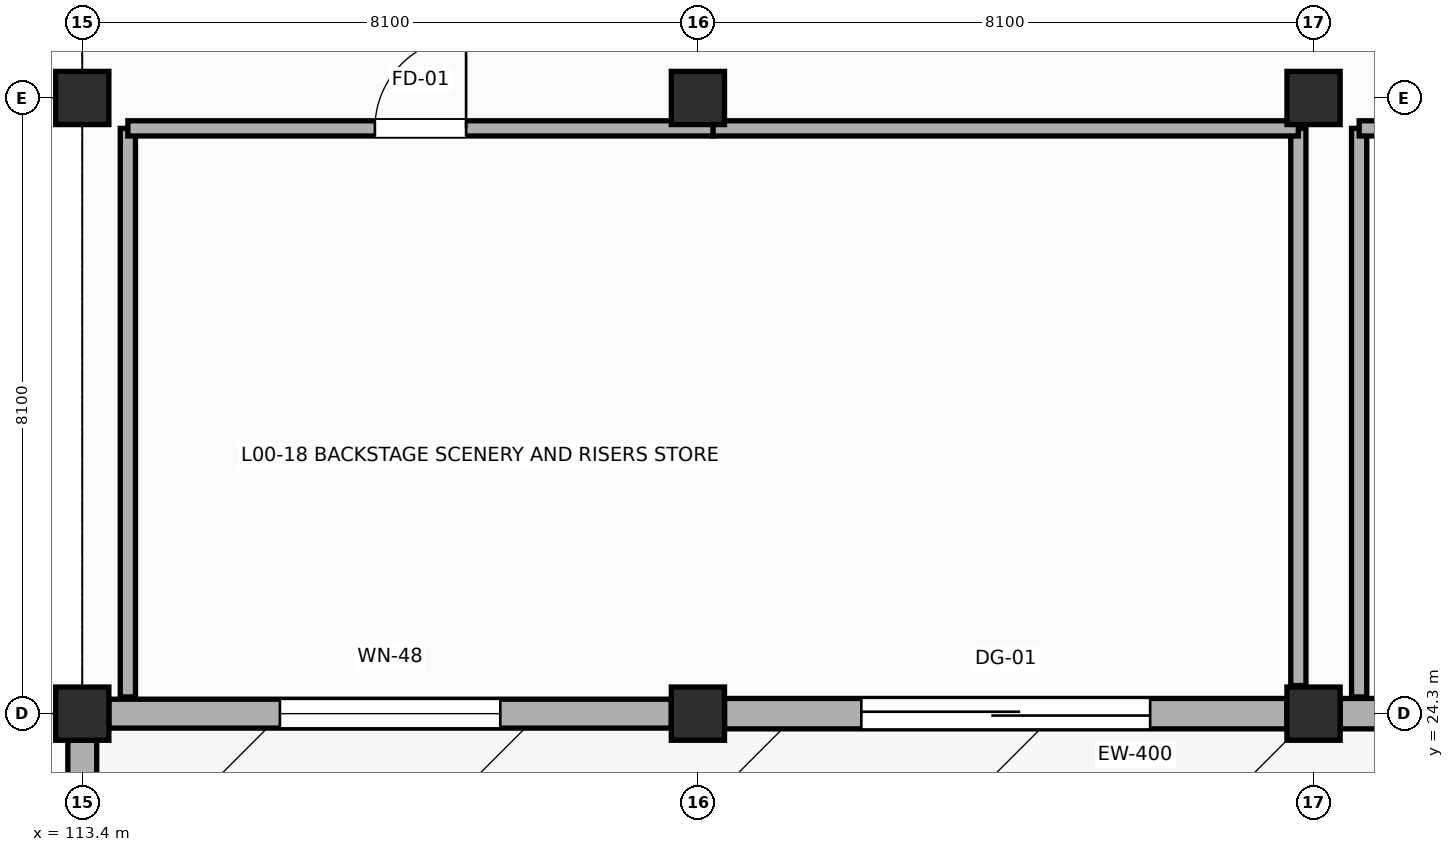
"""IFC4 building model, lengths in metres.
Left out: names, types, materials, properties, quantities, classifications, styles, units other than length and angle.
Written with IfcOpenShell. Run it as: python <this file> out.ifc"""

import sys

from ifc_helpers import new_model, si_unit, direction, frame, frame_2d, origin, origin_2d, place, context, subcontext, project, spatial, rectangle, extrude, element, fill, save


model = new_model("IFC4")
c1 = context("Model", 3, precision=1e-05, world=origin(), true_north=direction((0.0, 1.0)))
c2 = subcontext(c1, "Body", "Model", "MODEL_VIEW")
j1 = project(units=[si_unit("LENGTHUNIT", "METRE"), si_unit("PLANEANGLEUNIT", "RADIAN")], contexts=[c1])
p1 = place(None, origin())
s1 = spatial("IfcSite", under=j1, at=p1, CompositionType="ELEMENT")
p2 = place(p1, origin())
s2 = spatial("IfcBuilding", under=s1, at=p2, CompositionType="ELEMENT")
p3 = place(p2, origin())
s3 = spatial("IfcBuildingStorey", under=s2, at=p3, CompositionType="ELEMENT", Elevation=0.0)
for number, where, z_axis, x_axis in (
    (1, (113.4, 24.3, 0.0), (0.0, 0.0, 1.0), (1.0, 0.0, 0.0)),
    (2, (113.4, 32.4, 0.0), (0.0, 0.0, 1.0), (1.0, 0.0, 0.0)),
    (3, (121.5, 24.3, 0.0), (0.0, 0.0, 1.0), (1.0, 0.0, 0.0)),
    (4, (121.5, 32.4, 0.0), (0.0, 0.0, 1.0), (1.0, 0.0, 0.0)),
    (5, (129.6, 24.3, 0.0), (0.0, 0.0, 1.0), (1.0, 0.0, 0.0)),
    (6, (129.6, 32.4, 0.0), (0.0, 0.0, 1.0), (1.0, 0.0, 0.0)),
):
    element("IfcColumn", number, at=place(p3, frame(where, z_axis=z_axis, x_axis=x_axis)), inside=s3, PredefinedType="COLUMN", context=c2, shape_type="SweptSolid", body=[
        extrude(rectangle(XDim=0.7, YDim=0.7, at=origin_2d()), origin(), (0.0, 0.0, 1.0), 5.4),
    ])
p4 = place(p3, frame((129.25, 24.3, 0.0), z_axis=(0.0, 0.0, 1.0), x_axis=(-1.0, 0.0, 0.0)))
e7 = element("IfcWall", 7, at=p4, inside=s3, PredefinedType="SOLIDWALL", context=c2, shape_type="SweptSolid", body=[
    extrude(rectangle(XDim=7.4, YDim=0.4, at=frame_2d((3.7, 0.0))), origin(), (0.0, 0.0, 1.0), 4.695),
])
p5 = place(p4, frame((1.8, 0.0, 0.0)))
e8 = element("IfcOpeningElement", 8, at=p5, cuts=e7, PredefinedType="OPENING", context=c2, shape_type="SweptSolid", body=[
    extrude(rectangle(XDim=3.8, YDim=3.6, at=frame_2d((1.9, 1.8))), frame((0.0, 0.21, 0.0), z_axis=(0.0, -1.0, 0.0), x_axis=(1.0, 0.0, 0.0)), (0.0, 0.0, 1.0), 0.42),
])
p6 = place(p3, frame((137.35, 24.3, 0.0), z_axis=(0.0, 0.0, 1.0), x_axis=(-1.0, 0.0, 0.0)))
e9 = element("IfcWall", 9, at=p6, inside=s3, PredefinedType="SOLIDWALL", context=c2, shape_type="SweptSolid", body=[
    extrude(rectangle(XDim=7.4, YDim=0.4, at=frame_2d((3.7, 0.0))), origin(), (0.0, 0.0, 1.0), 4.747),
])
p7 = place(p6, frame((1.8, 0.0, 0.0)))
e10 = element("IfcOpeningElement", 10, at=p7, cuts=e9, PredefinedType="OPENING", context=c2, shape_type="SweptSolid", body=[
    extrude(rectangle(XDim=3.8, YDim=3.6, at=frame_2d((1.9, 1.8))), frame((0.0, 0.21, 0.0), z_axis=(0.0, -1.0, 0.0), x_axis=(1.0, 0.0, 0.0)), (0.0, 0.0, 1.0), 0.42),
])
p8 = place(p3, frame((113.4, 16.55, 0.0), z_axis=(0.0, 0.0, 1.0), x_axis=(0.0, 1.0, 0.0)))
e11 = element("IfcWall", 11, at=p8, inside=s3, PredefinedType="SOLIDWALL", context=c2, shape_type="SweptSolid", body=[
    extrude(rectangle(XDim=7.4, YDim=0.38, at=frame_2d((3.7, 0.0))), origin(), (0.0, 0.0, 1.0), 4.737),
])
p9 = place(p8, frame((2.3, 0.0, 0.9)))
e12 = element("IfcOpeningElement", 12, at=p9, cuts=e11, PredefinedType="OPENING", context=c2, shape_type="SweptSolid", body=[
    extrude(rectangle(XDim=2.8, YDim=2.1, at=frame_2d((1.4, 1.05))), frame((0.0, 0.2, 0.0), z_axis=(0.0, -1.0, 0.0), x_axis=(1.0, 0.0, 0.0)), (0.0, 0.0, 1.0), 0.4),
])
p10 = place(p3, frame((113.75, 24.3, 0.0), z_axis=(0.0, 0.0, 1.0), x_axis=(1.0, 0.0, 0.0)))
e13 = element("IfcWall", 13, at=p10, inside=s3, PredefinedType="SOLIDWALL", context=c2, shape_type="SweptSolid", body=[
    extrude(rectangle(XDim=7.4, YDim=0.38, at=frame_2d((3.7, 0.0))), origin(), (0.0, 0.0, 1.0), 4.664),
])
p11 = place(p10, frame((2.25, 0.0, 0.9)))
e14 = element("IfcOpeningElement", 14, at=p11, cuts=e13, PredefinedType="OPENING", context=c2, shape_type="SweptSolid", body=[
    extrude(rectangle(XDim=2.9, YDim=1.9, at=frame_2d((1.45, 0.95))), frame((0.0, 0.2, 0.0), z_axis=(0.0, -1.0, 0.0), x_axis=(1.0, 0.0, 0.0)), (0.0, 0.0, 1.0), 0.4),
])
p12 = place(p3, frame((130.2, 24.52, 0.0), z_axis=(0.0, 0.0, 1.0), x_axis=(0.0, 1.0, 0.0)))
e15 = element("IfcWall", 15, at=p12, inside=s3, PredefinedType="PARTITIONING", context=c2, shape_type="SweptSolid", body=[
    extrude(rectangle(XDim=7.48, YDim=0.2, at=frame_2d((3.74, 0.0))), origin(), (0.0, 0.0, 1.0), 5.12),
])
p13 = place(p3, frame((130.2, 32.0, 0.0), z_axis=(0.0, 0.0, 1.0), x_axis=(1.0, 0.0, 0.0)))
e16 = element("IfcWall", 16, at=p13, inside=s3, PredefinedType="PARTITIONING", context=c2, shape_type="SweptSolid", body=[
    extrude(rectangle(XDim=7.733, YDim=0.2, at=frame_2d((3.867, 0.0))), origin(), (0.0, 0.0, 1.0), 5.12),
])
p14 = place(p13, frame((1.473, 0.0, 0.0)))
e17 = element("IfcOpeningElement", 17, at=p14, cuts=e16, PredefinedType="OPENING", context=c2, shape_type="SweptSolid", body=[
    extrude(rectangle(XDim=0.92, YDim=2.1, at=frame_2d((0.46, 1.05))), frame((0.0, 0.11, 0.0), z_axis=(0.0, -1.0, 0.0), x_axis=(1.0, 0.0, 0.0)), (0.0, 0.0, 1.0), 0.22),
])
p15 = place(p3, frame((129.4, 32.0, 0.0), z_axis=(0.0, 0.0, 1.0), x_axis=(0.0, -1.0, 0.0)))
e18 = element("IfcWall", 18, at=p15, inside=s3, PredefinedType="PARTITIONING", context=c2, shape_type="SweptSolid", body=[
    extrude(rectangle(XDim=7.33, YDim=0.2, at=frame_2d((3.665, 0.0))), origin(), (0.0, 0.0, 1.0), 4.564),
])
p16 = place(p3, frame((114.0, 24.52, 0.0), z_axis=(0.0, 0.0, 1.0), x_axis=(0.0, 1.0, 0.0)))
e19 = element("IfcWall", 19, at=p16, inside=s3, PredefinedType="PARTITIONING", context=c2, shape_type="SweptSolid", body=[
    extrude(rectangle(XDim=7.48, YDim=0.2, at=frame_2d((3.74, 0.0))), origin(), (0.0, 0.0, 1.0), 5.12),
])
p17 = place(p3, frame((114.0, 32.0, 0.0), z_axis=(0.0, 0.0, 1.0), x_axis=(1.0, 0.0, 0.0)))
e20 = element("IfcWall", 20, at=p17, inside=s3, PredefinedType="PARTITIONING", context=c2, shape_type="SweptSolid", body=[
    extrude(rectangle(XDim=7.7, YDim=0.2, at=frame_2d((3.85, 0.0))), origin(), (0.0, 0.0, 1.0), 4.264),
])
p18 = place(p17, frame((3.25, 0.0, 0.0)))
e21 = element("IfcOpeningElement", 21, at=p18, cuts=e20, PredefinedType="OPENING", context=c2, shape_type="SweptSolid", body=[
    extrude(rectangle(XDim=1.2, YDim=2.25, at=frame_2d((0.6, 1.125))), frame((0.0, 0.11, 0.0), z_axis=(0.0, -1.0, 0.0), x_axis=(1.0, 0.0, 0.0)), (0.0, 0.0, 1.0), 0.22),
])
p19 = place(p3, frame((121.7, 32.0, 0.0), z_axis=(0.0, 0.0, 1.0), x_axis=(1.0, 0.0, 0.0)))
e22 = element("IfcWall", 22, at=p19, inside=s3, PredefinedType="PARTITIONING", context=c2, shape_type="SweptSolid", body=[
    extrude(rectangle(XDim=7.7, YDim=0.2, at=frame_2d((3.85, 0.0))), origin(), (0.0, 0.0, 1.0), 4.264),
])
p20 = place(p5, origin())
e23 = element("IfcDoor", 23, at=p20, inside=s3, OperationType="SINGLE_SWING_LEFT", PredefinedType="GATE", context=c2, shape_type="SweptSolid", body=[
    extrude(rectangle(XDim=3.8, YDim=3.6, at=frame_2d((1.9, 1.8))), frame((0.0, 0.025, 0.0), z_axis=(0.0, -1.0, 0.0), x_axis=(1.0, 0.0, 0.0)), (0.0, 0.0, 1.0), 0.05),
])
fill(e8, e23)
p21 = place(p11, origin())
e24 = element("IfcWindow", 24, at=p21, inside=s3, PartitioningType="SINGLE_PANEL", PredefinedType="WINDOW", context=c2, shape_type="SweptSolid", body=[
    extrude(rectangle(XDim=2.9, YDim=1.9, at=frame_2d((1.45, 0.95))), frame((0.0, 0.03, 0.0), z_axis=(0.0, -1.0, 0.0), x_axis=(1.0, 0.0, 0.0)), (0.0, 0.0, 1.0), 0.06),
])
fill(e14, e24)
p22 = place(p18, origin())
e25 = element("IfcDoor", 25, at=p22, inside=s3, OperationType="SINGLE_SWING_RIGHT", PredefinedType="DOOR", context=c2, shape_type="SweptSolid", body=[
    extrude(rectangle(XDim=1.2, YDim=2.25, at=frame_2d((0.6, 1.125))), frame((0.0, 0.025, 0.0), z_axis=(0.0, -1.0, 0.0), x_axis=(1.0, 0.0, 0.0)), (0.0, 0.0, 1.0), 0.05),
])
fill(e21, e25)
save(model, sys.argv[1])
